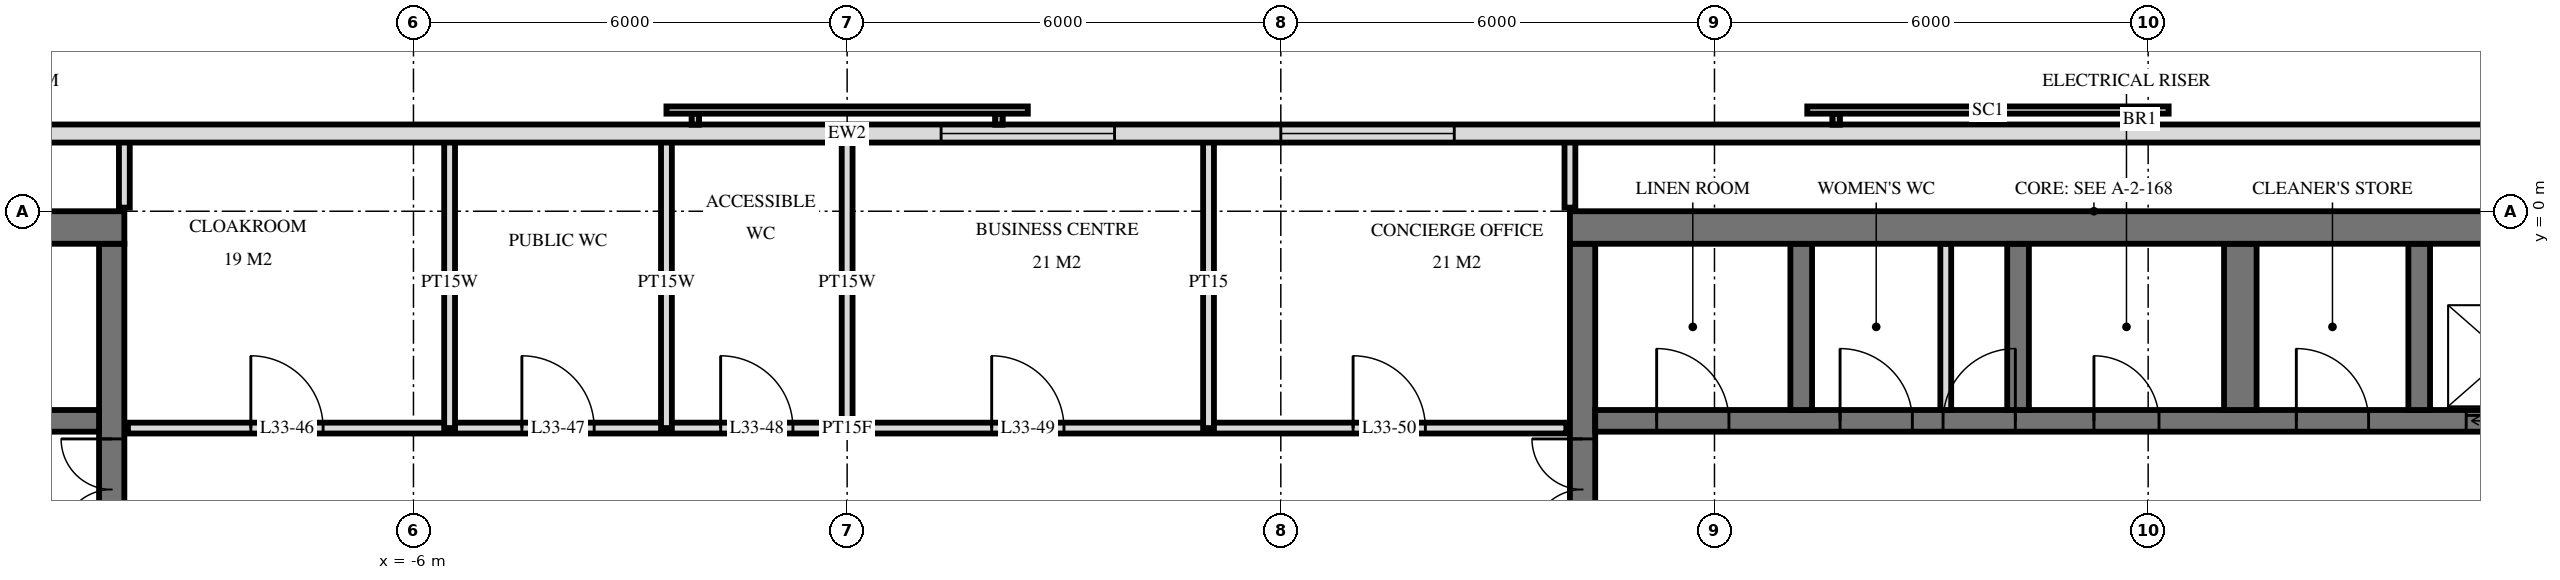
"""IFC4 building model, lengths in metres.
Left out: names, types, materials, properties, quantities, classifications, styles, units other than length and angle.
Written with IfcOpenShell. Run it as: python <this file> out.ifc"""

import sys

from ifc_helpers import new_model, si_unit, direction, frame, frame_2d, origin, place, context, subcontext, project, spatial, rectangle, extrude, element, fill, save


model = new_model("IFC4")
c1 = context("Model", 3, precision=1e-05, world=origin(), true_north=direction((0.0, 1.0)))
c2 = subcontext(c1, "Body", "Model", "MODEL_VIEW")
j1 = project(units=[si_unit("LENGTHUNIT", "METRE"), si_unit("PLANEANGLEUNIT", "RADIAN")], contexts=[c1])
p1 = place(None, origin())
s1 = spatial("IfcSite", under=j1, at=p1, CompositionType="ELEMENT")
p2 = place(p1, origin())
s2 = spatial("IfcBuilding", under=s1, at=p2, CompositionType="ELEMENT")
p3 = place(p2, frame((0.0, 0.0, 130.8)))
s3 = spatial("IfcBuildingStorey", under=s2, at=p3, CompositionType="ELEMENT", Elevation=130.8)
p4 = place(p3, frame((-24.5, -0.225, 0.0), z_axis=(0.0, 0.0, 1.0), x_axis=(1.0, 0.0, 0.0)))
e1 = element("IfcWall", 1, at=p4, inside=s3, PredefinedType="SHEAR", context=c2, shape_type="SweptSolid", body=[
    extrude(rectangle(XDim=14.5, YDim=0.45, at=frame_2d((7.25, 0.0))), origin(), (0.0, 0.0, 1.0), 3.6),
])
p5 = place(p3, frame((-10.175, -14.55, 0.0), z_axis=(0.0, 0.0, 1.0), x_axis=(0.0, 1.0, 0.0)))
e2 = element("IfcWall", 2, at=p5, inside=s3, PredefinedType="SHEAR", context=c2, shape_type="SweptSolid", body=[
    extrude(rectangle(XDim=14.1, YDim=0.35, at=frame_2d((7.05, 0.0))), origin(), (0.0, 0.0, 1.0), 3.6),
])
p6 = place(p5, frame((8.4, 0.0, 0.0)))
e3 = element("IfcOpeningElement", 3, at=p6, cuts=e2, PredefinedType="OPENING", context=c2, shape_type="SweptSolid", body=[
    extrude(rectangle(XDim=1.4, YDim=2.4, at=frame_2d((0.7, 1.2))), frame((0.0, 0.185, 0.0), z_axis=(0.0, -1.0, 0.0), x_axis=(1.0, 0.0, 0.0)), (0.0, 0.0, 1.0), 0.37),
])
p7 = place(p5, frame((10.0, 0.0, 0.0)))
e4 = element("IfcOpeningElement", 4, at=p7, cuts=e2, PredefinedType="OPENING", context=c2, shape_type="SweptSolid", body=[
    extrude(rectangle(XDim=1.4, YDim=2.4, at=frame_2d((0.7, 1.2))), frame((0.0, 0.185, 0.0), z_axis=(0.0, -1.0, 0.0), x_axis=(1.0, 0.0, 0.0)), (0.0, 0.0, 1.0), 0.37),
])
p8 = place(p5, frame((4.0, 0.0, 0.0)))
e5 = element("IfcOpeningElement", 5, at=p8, cuts=e2, PredefinedType="OPENING", context=c2, shape_type="SweptSolid", body=[
    extrude(rectangle(XDim=1.2, YDim=2.1, at=frame_2d((0.6, 1.05))), frame((0.0, 0.185, 0.0), z_axis=(0.0, -1.0, 0.0), x_axis=(1.0, 0.0, 0.0)), (0.0, 0.0, 1.0), 0.37),
])
p9 = place(p3, frame((-24.05, -2.9, 0.0), z_axis=(0.0, 0.0, 1.0), x_axis=(1.0, 0.0, 0.0)))
e6 = element("IfcWall", 6, at=p9, inside=s3, PredefinedType="SHEAR", context=c2, shape_type="SweptSolid", body=[
    extrude(rectangle(XDim=13.7, YDim=0.3, at=frame_2d((6.85, 0.0))), origin(), (0.0, 0.0, 1.0), 3.6),
])
p10 = place(p9, frame((0.55, 0.0, 0.0)))
e7 = element("IfcOpeningElement", 7, at=p10, cuts=e6, PredefinedType="OPENING", context=c2, shape_type="SweptSolid", body=[
    extrude(rectangle(XDim=1.1, YDim=2.1, at=frame_2d((0.55, 1.05))), frame((0.0, 0.16, 0.0), z_axis=(0.0, -1.0, 0.0), x_axis=(1.0, 0.0, 0.0)), (0.0, 0.0, 1.0), 0.32),
])
p11 = place(p9, frame((5.9, 0.0, 0.0)))
e8 = element("IfcOpeningElement", 8, at=p11, cuts=e6, PredefinedType="OPENING", context=c2, shape_type="SweptSolid", body=[
    extrude(rectangle(XDim=0.9, YDim=2.1, at=frame_2d((0.45, 1.05))), frame((0.0, 0.16, 0.0), z_axis=(0.0, -1.0, 0.0), x_axis=(1.0, 0.0, 0.0)), (0.0, 0.0, 1.0), 0.32),
])
p12 = place(p9, frame((11.85, 0.0, 0.0)))
e9 = element("IfcOpeningElement", 9, at=p12, cuts=e6, PredefinedType="OPENING", context=c2, shape_type="SweptSolid", body=[
    extrude(rectangle(XDim=1.0, YDim=2.1, at=frame_2d((0.5, 1.05))), frame((0.0, 0.16, 0.0), z_axis=(0.0, -1.0, 0.0), x_axis=(1.0, 0.0, 0.0)), (0.0, 0.0, 1.0), 0.32),
])
p13 = place(p9, frame((9.312, 0.0, 0.0)))
e10 = element("IfcOpeningElement", 10, at=p13, cuts=e6, PredefinedType="OPENING", context=c2, shape_type="SweptSolid", body=[
    extrude(rectangle(XDim=1.0, YDim=2.1, at=frame_2d((0.5, 1.05))), frame((0.0, 0.16, 0.0), z_axis=(0.0, -1.0, 0.0), x_axis=(1.0, 0.0, 0.0)), (0.0, 0.0, 1.0), 0.32),
])
p14 = place(p9, frame((7.887, 0.0, 0.0)))
e11 = element("IfcOpeningElement", 11, at=p14, cuts=e6, PredefinedType="OPENING", context=c2, shape_type="SweptSolid", body=[
    extrude(rectangle(XDim=1.0, YDim=2.1, at=frame_2d((0.5, 1.05))), frame((0.0, 0.16, 0.0), z_axis=(0.0, -1.0, 0.0), x_axis=(1.0, 0.0, 0.0)), (0.0, 0.0, 1.0), 0.32),
])
p15 = place(p9, frame((3.0, 0.0, 0.0)))
e12 = element("IfcOpeningElement", 12, at=p15, cuts=e6, PredefinedType="OPENING", context=c2, shape_type="SweptSolid", body=[
    extrude(rectangle(XDim=1.0, YDim=2.1, at=frame_2d((0.5, 1.05))), frame((0.0, 0.16, 0.0), z_axis=(0.0, -1.0, 0.0), x_axis=(1.0, 0.0, 0.0)), (0.0, 0.0, 1.0), 0.32),
])
p16 = place(p3, frame((10.0, -0.225, 0.0), z_axis=(0.0, 0.0, 1.0), x_axis=(1.0, 0.0, 0.0)))
e13 = element("IfcWall", 13, at=p16, inside=s3, PredefinedType="SHEAR", context=c2, shape_type="SweptSolid", body=[
    extrude(rectangle(XDim=14.5, YDim=0.45, at=frame_2d((7.25, 0.0))), origin(), (0.0, 0.0, 1.0), 3.6),
])
p17 = place(p3, frame((10.175, -14.55, 0.0), z_axis=(0.0, 0.0, 1.0), x_axis=(0.0, 1.0, 0.0)))
e14 = element("IfcWall", 14, at=p17, inside=s3, PredefinedType="SHEAR", context=c2, shape_type="SweptSolid", body=[
    extrude(rectangle(XDim=14.1, YDim=0.35, at=frame_2d((7.05, 0.0))), origin(), (0.0, 0.0, 1.0), 3.6),
])
p18 = place(p17, frame((8.4, 0.0, 0.0)))
e15 = element("IfcOpeningElement", 15, at=p18, cuts=e14, PredefinedType="OPENING", context=c2, shape_type="SweptSolid", body=[
    extrude(rectangle(XDim=1.4, YDim=2.4, at=frame_2d((0.7, 1.2))), frame((0.0, 0.185, 0.0), z_axis=(0.0, -1.0, 0.0), x_axis=(1.0, 0.0, 0.0)), (0.0, 0.0, 1.0), 0.37),
])
p19 = place(p17, frame((10.0, 0.0, 0.0)))
e16 = element("IfcOpeningElement", 16, at=p19, cuts=e14, PredefinedType="OPENING", context=c2, shape_type="SweptSolid", body=[
    extrude(rectangle(XDim=1.4, YDim=2.4, at=frame_2d((0.7, 1.2))), frame((0.0, 0.185, 0.0), z_axis=(0.0, -1.0, 0.0), x_axis=(1.0, 0.0, 0.0)), (0.0, 0.0, 1.0), 0.37),
])
p20 = place(p17, frame((4.0, 0.0, 0.0)))
e17 = element("IfcOpeningElement", 17, at=p20, cuts=e14, PredefinedType="OPENING", context=c2, shape_type="SweptSolid", body=[
    extrude(rectangle(XDim=1.2, YDim=2.1, at=frame_2d((0.6, 1.05))), frame((0.0, 0.185, 0.0), z_axis=(0.0, -1.0, 0.0), x_axis=(1.0, 0.0, 0.0)), (0.0, 0.0, 1.0), 0.37),
])
p21 = place(p3, frame((10.35, -2.9, 0.0), z_axis=(0.0, 0.0, 1.0), x_axis=(1.0, 0.0, 0.0)))
e18 = element("IfcWall", 18, at=p21, inside=s3, PredefinedType="SHEAR", context=c2, shape_type="SweptSolid", body=[
    extrude(rectangle(XDim=13.7, YDim=0.3, at=frame_2d((6.85, 0.0))), origin(), (0.0, 0.0, 1.0), 3.6),
])
p22 = place(p21, frame((12.05, 0.0, 0.0)))
e19 = element("IfcOpeningElement", 19, at=p22, cuts=e18, PredefinedType="OPENING", context=c2, shape_type="SweptSolid", body=[
    extrude(rectangle(XDim=1.1, YDim=2.1, at=frame_2d((0.55, 1.05))), frame((0.0, 0.16, 0.0), z_axis=(0.0, -1.0, 0.0), x_axis=(1.0, 0.0, 0.0)), (0.0, 0.0, 1.0), 0.32),
])
p23 = place(p21, frame((6.9, 0.0, 0.0)))
e20 = element("IfcOpeningElement", 20, at=p23, cuts=e18, PredefinedType="OPENING", context=c2, shape_type="SweptSolid", body=[
    extrude(rectangle(XDim=0.9, YDim=2.1, at=frame_2d((0.45, 1.05))), frame((0.0, 0.16, 0.0), z_axis=(0.0, -1.0, 0.0), x_axis=(1.0, 0.0, 0.0)), (0.0, 0.0, 1.0), 0.32),
])
p24 = place(p21, frame((0.85, 0.0, 0.0)))
e21 = element("IfcOpeningElement", 21, at=p24, cuts=e18, PredefinedType="OPENING", context=c2, shape_type="SweptSolid", body=[
    extrude(rectangle(XDim=1.0, YDim=2.1, at=frame_2d((0.5, 1.05))), frame((0.0, 0.16, 0.0), z_axis=(0.0, -1.0, 0.0), x_axis=(1.0, 0.0, 0.0)), (0.0, 0.0, 1.0), 0.32),
])
p25 = place(p21, frame((3.387, 0.0, 0.0)))
e22 = element("IfcOpeningElement", 22, at=p25, cuts=e18, PredefinedType="OPENING", context=c2, shape_type="SweptSolid", body=[
    extrude(rectangle(XDim=1.0, YDim=2.1, at=frame_2d((0.5, 1.05))), frame((0.0, 0.16, 0.0), z_axis=(0.0, -1.0, 0.0), x_axis=(1.0, 0.0, 0.0)), (0.0, 0.0, 1.0), 0.32),
])
p26 = place(p21, frame((4.812, 0.0, 0.0)))
e23 = element("IfcOpeningElement", 23, at=p26, cuts=e18, PredefinedType="OPENING", context=c2, shape_type="SweptSolid", body=[
    extrude(rectangle(XDim=1.0, YDim=2.1, at=frame_2d((0.5, 1.05))), frame((0.0, 0.16, 0.0), z_axis=(0.0, -1.0, 0.0), x_axis=(1.0, 0.0, 0.0)), (0.0, 0.0, 1.0), 0.32),
])
p27 = place(p21, frame((9.7, 0.0, 0.0)))
e24 = element("IfcOpeningElement", 24, at=p27, cuts=e18, PredefinedType="OPENING", context=c2, shape_type="SweptSolid", body=[
    extrude(rectangle(XDim=1.0, YDim=2.1, at=frame_2d((0.5, 1.05))), frame((0.0, 0.16, 0.0), z_axis=(0.0, -1.0, 0.0), x_axis=(1.0, 0.0, 0.0)), (0.0, 0.0, 1.0), 0.32),
])
for number, where, z_axis, x_axis in (
    (25, (13.2, -2.75, 0.0), (0.0, 0.0, 1.0), (0.0, 1.0, 0.0)),
    (26, (16.2, -2.75, 0.0), (0.0, 0.0, 1.0), (0.0, 1.0, 0.0)),
):
    element("IfcWall", number, at=place(p3, frame(where, z_axis=z_axis, x_axis=x_axis)), inside=s3, PredefinedType="SHEAR", context=c2, shape_type="SweptSolid", body=[
        extrude(rectangle(XDim=2.3, YDim=0.3, at=frame_2d((1.15, 0.0))), origin(), (0.0, 0.0, 1.0), 3.6),
    ])
p28 = place(p3, frame((19.275, -2.75, 0.0), z_axis=(0.0, 0.0, 1.0), x_axis=(0.0, 1.0, 0.0)))
e27 = element("IfcWall", 27, at=p28, inside=s3, PredefinedType="SHEAR", context=c2, shape_type="SweptSolid", body=[
    extrude(rectangle(XDim=2.3, YDim=0.45, at=frame_2d((1.15, 0.0))), origin(), (0.0, 0.0, 1.0), 3.6),
])
p29 = place(p3, frame((21.75, -2.75, 0.0), z_axis=(0.0, 0.0, 1.0), x_axis=(0.0, 1.0, 0.0)))
e28 = element("IfcWall", 28, at=p29, inside=s3, PredefinedType="SHEAR", context=c2, shape_type="SweptSolid", body=[
    extrude(rectangle(XDim=2.3, YDim=0.3, at=frame_2d((1.15, 0.0))), origin(), (0.0, 0.0, 1.0), 3.6),
])
p30 = place(p3, frame((23.675, 1.075, 0.0), z_axis=(0.0, 0.0, 1.0), x_axis=(-1.0, 0.0, 0.0)))
e29 = element("IfcWall", 29, at=p30, inside=s3, PredefinedType="SOLIDWALL", context=c2, shape_type="SweptSolid", body=[
    extrude(rectangle(XDim=47.351, YDim=0.25, at=frame_2d((23.675, 0.0))), origin(), (0.0, 0.0, 1.0), 3.32),
])
p31 = place(p30, frame((15.275, 0.0, 0.3)))
e30 = element("IfcOpeningElement", 30, at=p31, cuts=e29, PredefinedType="OPENING", context=c2, shape_type="SweptSolid", body=[
    extrude(rectangle(XDim=2.4, YDim=2.1, at=frame_2d((1.2, 1.05))), frame((0.0, 0.135, 0.0), z_axis=(0.0, -1.0, 0.0), x_axis=(1.0, 0.0, 0.0)), (0.0, 0.0, 1.0), 0.27),
])
p32 = place(p30, frame((19.975, 0.0, 0.3)))
e31 = element("IfcOpeningElement", 31, at=p32, cuts=e29, PredefinedType="OPENING", context=c2, shape_type="SweptSolid", body=[
    extrude(rectangle(XDim=2.4, YDim=2.1, at=frame_2d((1.2, 1.05))), frame((0.0, 0.135, 0.0), z_axis=(0.0, -1.0, 0.0), x_axis=(1.0, 0.0, 0.0)), (0.0, 0.0, 1.0), 0.27),
])
p33 = place(p3, frame((15.2, -2.75, 0.0), z_axis=(0.0, 0.0, 1.0), x_axis=(0.0, 1.0, 0.0)))
e32 = element("IfcWall", 32, at=p33, inside=s3, PredefinedType="PARTITIONING", context=c2, shape_type="SweptSolid", body=[
    extrude(rectangle(XDim=2.3, YDim=0.15, at=frame_2d((1.15, 0.0))), origin(), (0.0, 0.0, 1.0), 3.3),
])
p34 = place(p3, frame((10.0, 0.05, 0.0), z_axis=(0.0, 0.0, 1.0), x_axis=(0.0, 1.0, 0.0)))
e33 = element("IfcWall", 33, at=p34, inside=s3, PredefinedType="PARTITIONING", context=c2, shape_type="SweptSolid", body=[
    extrude(rectangle(XDim=0.97, YDim=0.15, at=frame_2d((0.485, 0.0))), origin(), (0.0, 0.0, 1.0), 3.32),
])
p35 = place(p3, frame((5.0, -3.0, 0.0), z_axis=(0.0, 0.0, 1.0), x_axis=(0.0, 1.0, 0.0)))
e34 = element("IfcWall", 34, at=p35, inside=s3, PredefinedType="PARTITIONING", context=c2, shape_type="SweptSolid", body=[
    extrude(rectangle(XDim=4.02, YDim=0.15, at=frame_2d((2.01, 0.0))), origin(), (0.0, 0.0, 1.0), 3.32),
])
for number, where, z_axis, x_axis in (
    (35, (0.0, -3.0, 0.0), (0.0, 0.0, 1.0), (0.0, 1.0, 0.0)),
    (36, (-2.5, -3.0, 0.0), (0.0, 0.0, 1.0), (0.0, 1.0, 0.0)),
    (37, (-5.5, -3.0, 0.0), (0.0, 0.0, 1.0), (0.0, 1.0, 0.0)),
):
    element("IfcWall", number, at=place(p3, frame(where, z_axis=z_axis, x_axis=x_axis)), inside=s3, PredefinedType="PLUMBINGWALL", context=c2, shape_type="SweptSolid", body=[
        extrude(rectangle(XDim=4.02, YDim=0.15, at=frame_2d((2.01, 0.0))), origin(), (0.0, 0.0, 1.0), 3.32),
    ])
p36 = place(p3, frame((-10.0, 0.05, 0.0), z_axis=(0.0, 0.0, 1.0), x_axis=(0.0, 1.0, 0.0)))
e38 = element("IfcWall", 38, at=p36, inside=s3, PredefinedType="PARTITIONING", context=c2, shape_type="SweptSolid", body=[
    extrude(rectangle(XDim=0.97, YDim=0.15, at=frame_2d((0.485, 0.0))), origin(), (0.0, 0.0, 1.0), 3.32),
])
p37 = place(p3, frame((-9.95, -3.0, 0.0), z_axis=(0.0, 0.0, 1.0), x_axis=(1.0, 0.0, 0.0)))
e39 = element("IfcWall", 39, at=p37, inside=s3, PredefinedType="PARTITIONING", context=c2, shape_type="SweptSolid", body=[
    extrude(rectangle(XDim=19.9, YDim=0.15, at=frame_2d((9.95, 0.0))), origin(), (0.0, 0.0, 1.0), 3.32),
])
p38 = place(p37, frame((1.7, 0.0, 0.0)))
e40 = element("IfcOpeningElement", 40, at=p38, cuts=e39, PredefinedType="OPENING", context=c2, shape_type="SweptSolid", body=[
    extrude(rectangle(XDim=1.0, YDim=2.1, at=frame_2d((0.5, 1.05))), frame((0.0, 0.085, 0.0), z_axis=(0.0, -1.0, 0.0), x_axis=(1.0, 0.0, 0.0)), (0.0, 0.0, 1.0), 0.17),
])
p39 = place(p37, frame((5.45, 0.0, 0.0)))
e41 = element("IfcOpeningElement", 41, at=p39, cuts=e39, PredefinedType="OPENING", context=c2, shape_type="SweptSolid", body=[
    extrude(rectangle(XDim=1.0, YDim=2.1, at=frame_2d((0.5, 1.05))), frame((0.0, 0.085, 0.0), z_axis=(0.0, -1.0, 0.0), x_axis=(1.0, 0.0, 0.0)), (0.0, 0.0, 1.0), 0.17),
])
p40 = place(p37, frame((8.2, 0.0, 0.0)))
e42 = element("IfcOpeningElement", 42, at=p40, cuts=e39, PredefinedType="OPENING", context=c2, shape_type="SweptSolid", body=[
    extrude(rectangle(XDim=1.0, YDim=2.1, at=frame_2d((0.5, 1.05))), frame((0.0, 0.085, 0.0), z_axis=(0.0, -1.0, 0.0), x_axis=(1.0, 0.0, 0.0)), (0.0, 0.0, 1.0), 0.17),
])
p41 = place(p37, frame((11.95, 0.0, 0.0)))
e43 = element("IfcOpeningElement", 43, at=p41, cuts=e39, PredefinedType="OPENING", context=c2, shape_type="SweptSolid", body=[
    extrude(rectangle(XDim=1.0, YDim=2.1, at=frame_2d((0.5, 1.05))), frame((0.0, 0.085, 0.0), z_axis=(0.0, -1.0, 0.0), x_axis=(1.0, 0.0, 0.0)), (0.0, 0.0, 1.0), 0.17),
])
p42 = place(p37, frame((16.95, 0.0, 0.0)))
e44 = element("IfcOpeningElement", 44, at=p42, cuts=e39, PredefinedType="OPENING", context=c2, shape_type="SweptSolid", body=[
    extrude(rectangle(XDim=1.0, YDim=2.1, at=frame_2d((0.5, 1.05))), frame((0.0, 0.085, 0.0), z_axis=(0.0, -1.0, 0.0), x_axis=(1.0, 0.0, 0.0)), (0.0, 0.0, 1.0), 0.17),
])
p43 = place(p31, origin())
e45 = element("IfcWindow", 45, at=p43, inside=s3, PartitioningType="SINGLE_PANEL", PredefinedType="WINDOW", context=c2, shape_type="SweptSolid", body=[
    extrude(rectangle(XDim=2.4, YDim=2.1, at=frame_2d((1.2, 1.05))), frame((0.0, 0.03, 0.0), z_axis=(0.0, -1.0, 0.0), x_axis=(1.0, 0.0, 0.0)), (0.0, 0.0, 1.0), 0.06),
])
fill(e30, e45)
p44 = place(p32, origin())
e46 = element("IfcWindow", 46, at=p44, inside=s3, PartitioningType="SINGLE_PANEL", PredefinedType="WINDOW", context=c2, shape_type="SweptSolid", body=[
    extrude(rectangle(XDim=2.4, YDim=2.1, at=frame_2d((1.2, 1.05))), frame((0.0, 0.03, 0.0), z_axis=(0.0, -1.0, 0.0), x_axis=(1.0, 0.0, 0.0)), (0.0, 0.0, 1.0), 0.06),
])
fill(e31, e46)
p45 = place(p22, origin())
e47 = element("IfcDoor", 47, at=p45, inside=s3, OperationType="DOUBLE_DOOR_SLIDING", PredefinedType="USERDEFINED", context=c2, shape_type="SweptSolid", body=[
    extrude(rectangle(XDim=1.1, YDim=2.1, at=frame_2d((0.55, 1.05))), frame((0.0, 0.025, 0.0), z_axis=(0.0, -1.0, 0.0), x_axis=(1.0, 0.0, 0.0)), (0.0, 0.0, 1.0), 0.05),
])
fill(e19, e47)
p46 = place(p7, origin())
e48 = element("IfcDoor", 48, at=p46, inside=s3, OperationType="DOUBLE_DOOR_SINGLE_SWING", PredefinedType="DOOR", context=c2, shape_type="SweptSolid", body=[
    extrude(rectangle(XDim=1.4, YDim=2.4, at=frame_2d((0.7, 1.2))), frame((0.0, 0.025, 0.0), z_axis=(0.0, -1.0, 0.0), x_axis=(1.0, 0.0, 0.0)), (0.0, 0.0, 1.0), 0.05),
])
fill(e4, e48)
p47 = place(p19, origin())
e49 = element("IfcDoor", 49, at=p47, inside=s3, OperationType="DOUBLE_DOOR_SINGLE_SWING", PredefinedType="DOOR", context=c2, shape_type="SweptSolid", body=[
    extrude(rectangle(XDim=1.4, YDim=2.4, at=frame_2d((0.7, 1.2))), frame((0.0, 0.025, 0.0), z_axis=(0.0, -1.0, 0.0), x_axis=(1.0, 0.0, 0.0)), (0.0, 0.0, 1.0), 0.05),
])
fill(e16, e49)
p48 = place(p23, origin())
e50 = element("IfcDoor", 50, at=p48, inside=s3, OperationType="SINGLE_SWING_RIGHT", PredefinedType="DOOR", context=c2, shape_type="SweptSolid", body=[
    extrude(rectangle(XDim=0.9, YDim=2.1, at=frame_2d((0.45, 1.05))), frame((0.0, 0.025, 0.0), z_axis=(0.0, -1.0, 0.0), x_axis=(1.0, 0.0, 0.0)), (0.0, 0.0, 1.0), 0.05),
])
fill(e20, e50)
p49 = place(p24, origin())
e51 = element("IfcDoor", 51, at=p49, inside=s3, OperationType="SINGLE_SWING_RIGHT", PredefinedType="DOOR", context=c2, shape_type="SweptSolid", body=[
    extrude(rectangle(XDim=1.0, YDim=2.1, at=frame_2d((0.5, 1.05))), frame((0.0, 0.025, 0.0), z_axis=(0.0, -1.0, 0.0), x_axis=(1.0, 0.0, 0.0)), (0.0, 0.0, 1.0), 0.05),
])
fill(e21, e51)
p50 = place(p25, origin())
e52 = element("IfcDoor", 52, at=p50, inside=s3, OperationType="SINGLE_SWING_RIGHT", PredefinedType="DOOR", context=c2, shape_type="SweptSolid", body=[
    extrude(rectangle(XDim=1.0, YDim=2.1, at=frame_2d((0.5, 1.05))), frame((0.0, 0.025, 0.0), z_axis=(0.0, -1.0, 0.0), x_axis=(1.0, 0.0, 0.0)), (0.0, 0.0, 1.0), 0.05),
])
fill(e22, e52)
p51 = place(p26, origin())
e53 = element("IfcDoor", 53, at=p51, inside=s3, OperationType="SINGLE_SWING_LEFT", PredefinedType="DOOR", context=c2, shape_type="SweptSolid", body=[
    extrude(rectangle(XDim=1.0, YDim=2.1, at=frame_2d((0.5, 1.05))), frame((0.0, 0.025, 0.0), z_axis=(0.0, -1.0, 0.0), x_axis=(1.0, 0.0, 0.0)), (0.0, 0.0, 1.0), 0.05),
])
fill(e23, e53)
p52 = place(p27, origin())
e54 = element("IfcDoor", 54, at=p52, inside=s3, OperationType="SINGLE_SWING_RIGHT", PredefinedType="DOOR", context=c2, shape_type="SweptSolid", body=[
    extrude(rectangle(XDim=1.0, YDim=2.1, at=frame_2d((0.5, 1.05))), frame((0.0, 0.025, 0.0), z_axis=(0.0, -1.0, 0.0), x_axis=(1.0, 0.0, 0.0)), (0.0, 0.0, 1.0), 0.05),
])
fill(e24, e54)
p53 = place(p38, origin())
e55 = element("IfcDoor", 55, at=p53, inside=s3, OperationType="SINGLE_SWING_RIGHT", PredefinedType="DOOR", context=c2, shape_type="SweptSolid", body=[
    extrude(rectangle(XDim=1.0, YDim=2.1, at=frame_2d((0.5, 1.05))), frame((0.0, 0.025, 0.0), z_axis=(0.0, -1.0, 0.0), x_axis=(1.0, 0.0, 0.0)), (0.0, 0.0, 1.0), 0.05),
])
fill(e40, e55)
p54 = place(p39, origin())
e56 = element("IfcDoor", 56, at=p54, inside=s3, OperationType="SINGLE_SWING_RIGHT", PredefinedType="DOOR", context=c2, shape_type="SweptSolid", body=[
    extrude(rectangle(XDim=1.0, YDim=2.1, at=frame_2d((0.5, 1.05))), frame((0.0, 0.025, 0.0), z_axis=(0.0, -1.0, 0.0), x_axis=(1.0, 0.0, 0.0)), (0.0, 0.0, 1.0), 0.05),
])
fill(e41, e56)
p55 = place(p40, origin())
e57 = element("IfcDoor", 57, at=p55, inside=s3, OperationType="SINGLE_SWING_RIGHT", PredefinedType="DOOR", context=c2, shape_type="SweptSolid", body=[
    extrude(rectangle(XDim=1.0, YDim=2.1, at=frame_2d((0.5, 1.05))), frame((0.0, 0.025, 0.0), z_axis=(0.0, -1.0, 0.0), x_axis=(1.0, 0.0, 0.0)), (0.0, 0.0, 1.0), 0.05),
])
fill(e42, e57)
p56 = place(p41, origin())
e58 = element("IfcDoor", 58, at=p56, inside=s3, OperationType="SINGLE_SWING_RIGHT", PredefinedType="DOOR", context=c2, shape_type="SweptSolid", body=[
    extrude(rectangle(XDim=1.0, YDim=2.1, at=frame_2d((0.5, 1.05))), frame((0.0, 0.025, 0.0), z_axis=(0.0, -1.0, 0.0), x_axis=(1.0, 0.0, 0.0)), (0.0, 0.0, 1.0), 0.05),
])
fill(e43, e58)
p57 = place(p42, origin())
e59 = element("IfcDoor", 59, at=p57, inside=s3, OperationType="SINGLE_SWING_RIGHT", PredefinedType="DOOR", context=c2, shape_type="SweptSolid", body=[
    extrude(rectangle(XDim=1.0, YDim=2.1, at=frame_2d((0.5, 1.05))), frame((0.0, 0.025, 0.0), z_axis=(0.0, -1.0, 0.0), x_axis=(1.0, 0.0, 0.0)), (0.0, 0.0, 1.0), 0.05),
])
fill(e44, e59)
save(model, sys.argv[1])
